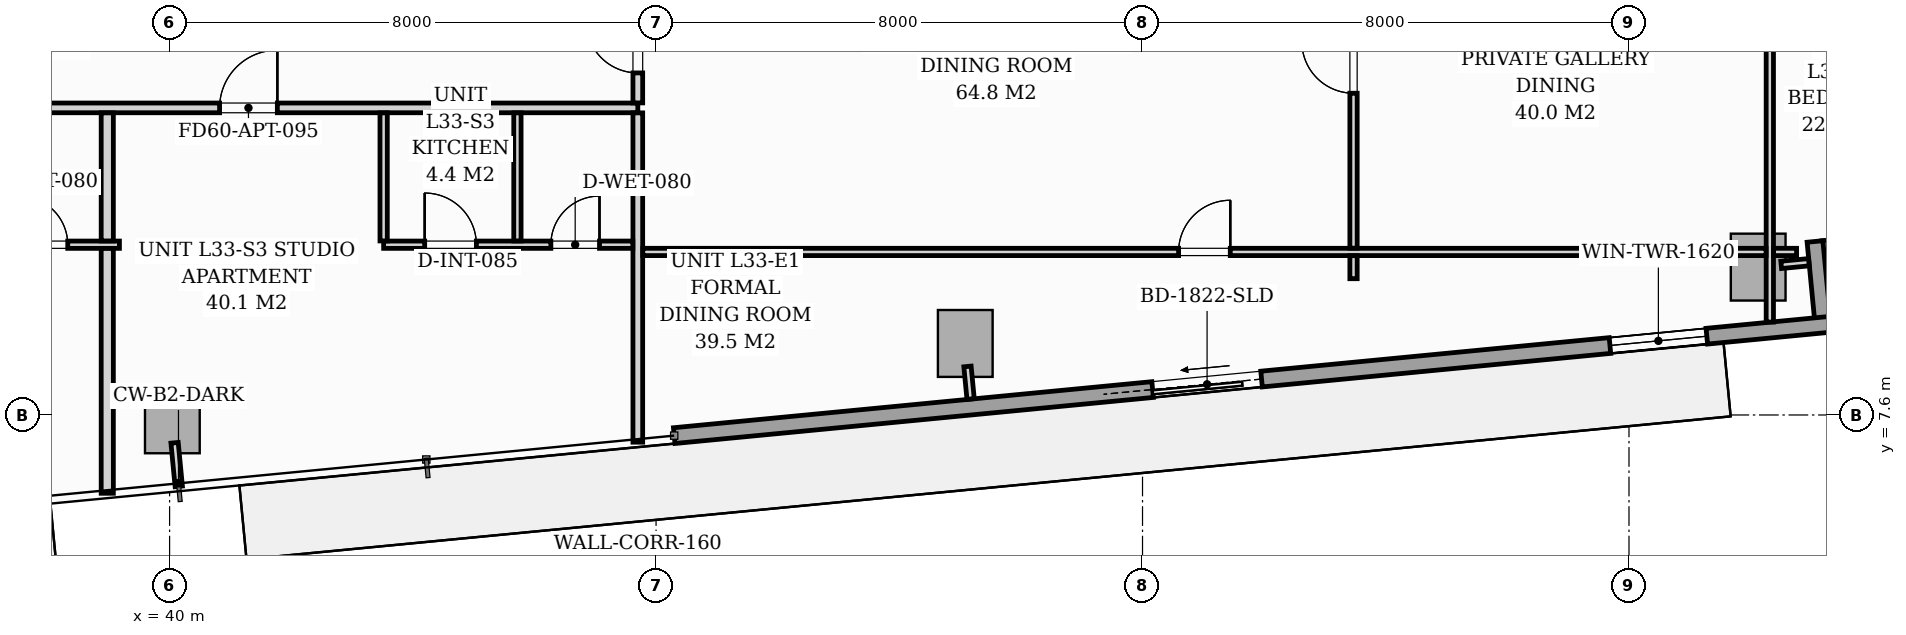
"""IFC4 building model, lengths in metres.
Left out: names, types, materials, properties, quantities, classifications, styles, units other than length and angle.
Written with IfcOpenShell. Run it as: python <this file> out.ifc"""

import sys

from ifc_helpers import new_model, si_unit, direction, frame, frame_2d, origin, origin_2d, place, context, subcontext, project, spatial, rectangle, extrude, source, transform, mapped, element, fill, save


model = new_model("IFC4")
c1 = context("Model", 3, precision=1e-05, world=origin(), true_north=direction((0.0, 1.0)))
c2 = subcontext(c1, "Body", "Model", "MODEL_VIEW")
j1 = project(units=[si_unit("LENGTHUNIT", "METRE"), si_unit("PLANEANGLEUNIT", "RADIAN")], contexts=[c1])
p1 = place(None, origin())
s1 = spatial("IfcSite", under=j1, at=p1, CompositionType="ELEMENT")
p2 = place(p1, origin())
s2 = spatial("IfcBuilding", under=s1, at=p2, CompositionType="ELEMENT")
p3 = place(p2, frame((0.0, 0.0, 116.2)))
s3 = spatial("IfcBuildingStorey", under=s2, at=p3, CompositionType="ELEMENT", Elevation=116.2)
m1 = source(origin(), c2, "Body", "SweptSolid", [
    extrude(rectangle(XDim=0.9, YDim=1.1, at=origin_2d()), origin(), (0.0, 0.0, 1.0), 3.194),
])
for number, where, z_axis, x_axis in (
    (1, (40.045, 7.521, 0.002), (0.0, 0.0, 1.0), (0.995, 0.096, 0.0)),
    (2, (53.085, 8.776, 0.002), (0.0, 0.0, 1.0), (0.995, 0.096, 0.0)),
    (3, (66.125, 10.032, 0.002), (0.0, 0.0, 1.0), (0.995, 0.096, 0.0)),
):
    element("IfcColumn", number, at=place(p3, frame(where, z_axis=z_axis, x_axis=x_axis)), inside=s3, PredefinedType="COLUMN", context=c2, shape_type="MappedRepresentation", body=[
        mapped(m1, transform((0.0, 0.0, 0.0), scale=1.0)),
    ])
p4 = place(p3, frame((68.574, 10.469, 0.0), z_axis=(0.0, 0.0, 1.0), x_axis=(-0.99540774648, -0.095725744959, 0.0)))
e4 = element("IfcWall", 4, at=p4, inside=s3, PredefinedType="STANDARD", context=c2, shape_type="SweptSolid", body=[
    extrude(rectangle(XDim=1.395, YDim=0.26, at=frame_2d((0.698, 0.0))), origin(), (0.0, 0.0, 1.0), 2.9),
])
p5 = place(p3, frame((67.059, 10.453, 0.0), z_axis=(0.0, 0.0, 1.0), x_axis=(0.095915846097, -0.995389446633, 0.0)))
e5 = element("IfcWall", 5, at=p5, inside=s3, PredefinedType="STANDARD", context=c2, shape_type="SweptSolid", body=[
    extrude(rectangle(XDim=1.395, YDim=0.26, at=frame_2d((0.697, 0.0))), origin(), (0.0, 0.0, 1.0), 2.9),
])
p6 = place(p3, frame((67.32, 9.092, 0.0), z_axis=(0.0, 0.0, 1.0), x_axis=(-0.995396521236, -0.095842399342, 0.0)))
e6 = element("IfcWall", 6, at=p6, inside=s3, PredefinedType="STANDARD", context=c2, shape_type="SweptSolid", body=[
    extrude(rectangle(XDim=19.11, YDim=0.26, at=frame_2d((9.555, 0.0))), origin(), (0.0, 0.0, 1.0), 2.9),
])
p7 = place(p6, frame((9.406, 0.0, 0.0)))
e7 = element("IfcOpeningElement", 7, at=p7, cuts=e6, PredefinedType="OPENING", context=c2, shape_type="SweptSolid", body=[
    extrude(rectangle(XDim=1.8, YDim=2.06, at=frame_2d((0.9, 1.03))), frame((0.0, 0.14, 0.0), z_axis=(0.0, -1.0, 0.0), x_axis=(1.0, 0.0, 0.0)), (0.0, 0.0, 1.0), 0.28),
])
p8 = place(p6, frame((2.05, 0.0, 0.65)))
e8 = element("IfcOpeningElement", 8, at=p8, cuts=e6, PredefinedType="OPENING", context=c2, shape_type="SweptSolid", body=[
    extrude(rectangle(XDim=1.6, YDim=1.5, at=frame_2d((0.8, 0.75))), frame((0.0, 0.14, 0.0), z_axis=(0.0, -1.0, 0.0), x_axis=(1.0, 0.0, 0.0)), (0.0, 0.0, 1.0), 0.28),
])
p9 = place(p3, frame((21.5, 12.65, 0.0), z_axis=(0.0, 0.0, 1.0), x_axis=(1.0, 0.0, 0.0)))
e9 = element("IfcWall", 9, at=p9, inside=s3, PredefinedType="PARTITIONING", context=c2, shape_type="SweptSolid", body=[
    extrude(rectangle(XDim=26.2, YDim=0.16, at=frame_2d((13.1, 0.0))), origin(), (0.0, 0.0, 1.0), 2.9),
])
p10 = place(p9, frame((5.927, 0.0, 0.0)))
e10 = element("IfcOpeningElement", 10, at=p10, cuts=e9, PredefinedType="OPENING", context=c2, shape_type="SweptSolid", body=[
    extrude(rectangle(XDim=0.95, YDim=2.06, at=frame_2d((0.475, 1.03))), frame((0.0, 0.09, 0.0), z_axis=(0.0, -1.0, 0.0), x_axis=(1.0, 0.0, 0.0)), (0.0, 0.0, 1.0), 0.18),
])
p11 = place(p9, frame((10.575, 0.0, 0.0)))
e11 = element("IfcOpeningElement", 11, at=p11, cuts=e9, PredefinedType="OPENING", context=c2, shape_type="SweptSolid", body=[
    extrude(rectangle(XDim=0.95, YDim=2.06, at=frame_2d((0.475, 1.03))), frame((0.0, 0.09, 0.0), z_axis=(0.0, -1.0, 0.0), x_axis=(1.0, 0.0, 0.0)), (0.0, 0.0, 1.0), 0.18),
])
p12 = place(p9, frame((19.322, 0.0, 0.0)))
e12 = element("IfcOpeningElement", 12, at=p12, cuts=e9, PredefinedType="OPENING", context=c2, shape_type="SweptSolid", body=[
    extrude(rectangle(XDim=0.95, YDim=2.06, at=frame_2d((0.475, 1.03))), frame((0.0, 0.09, 0.0), z_axis=(0.0, -1.0, 0.0), x_axis=(1.0, 0.0, 0.0)), (0.0, 0.0, 1.0), 0.18),
])
p13 = place(p3, frame((47.7, 7.153, 0.0), z_axis=(0.0, 0.0, 1.0), x_axis=(0.0, 1.0, 0.0)))
e13 = element("IfcWall", 13, at=p13, inside=s3, PredefinedType="PARTITIONING", context=c2, shape_type="SweptSolid", body=[
    extrude(rectangle(XDim=5.416, YDim=0.16, at=frame_2d((2.708, 0.0))), origin(), (0.0, 0.0, 1.0), 2.9),
])
p14 = place(p3, frame((47.7, 12.732, 0.0), z_axis=(0.0, 0.0, 1.0), x_axis=(0.0, 1.0, 0.0)))
e14 = element("IfcWall", 14, at=p14, inside=s3, PredefinedType="PARTITIONING", context=c2, shape_type="SweptSolid", body=[
    extrude(rectangle(XDim=7.918, YDim=0.16, at=frame_2d((3.959, 0.0))), origin(), (0.0, 0.0, 1.0), 2.9),
])
p15 = place(p14, frame((0.493, 0.0, 0.0)))
e15 = element("IfcOpeningElement", 15, at=p15, cuts=e14, PredefinedType="OPENING", context=c2, shape_type="SweptSolid", body=[
    extrude(rectangle(XDim=0.85, YDim=2.0, at=frame_2d((0.425, 1.0))), frame((0.0, 0.09, 0.0), z_axis=(0.0, -1.0, 0.0), x_axis=(1.0, 0.0, 0.0)), (0.0, 0.0, 1.0), 0.18),
])
p16 = place(p14, frame((6.311, 0.0, 0.0)))
e16 = element("IfcOpeningElement", 16, at=p16, cuts=e14, PredefinedType="OPENING", context=c2, shape_type="SweptSolid", body=[
    extrude(rectangle(XDim=0.95, YDim=2.06, at=frame_2d((0.475, 1.03))), frame((0.0, 0.09, 0.0), z_axis=(0.0, -1.0, 0.0), x_axis=(1.0, 0.0, 0.0)), (0.0, 0.0, 1.0), 0.18),
])
p17 = place(p3, frame((34.775, 10.4, 0.0), z_axis=(0.0, 0.0, 1.0), x_axis=(1.0, 0.0, 0.0)))
e17 = element("IfcWall", 17, at=p17, inside=s3, PredefinedType="PARTITIONING", context=c2, shape_type="SweptSolid", body=[
    extrude(rectangle(XDim=4.4, YDim=0.12, at=frame_2d((2.2, 0.0))), origin(), (0.0, 0.0, 1.0), 2.9),
])
p18 = place(p17, frame((0.675, 0.0, 0.0)))
e18 = element("IfcOpeningElement", 18, at=p18, cuts=e17, PredefinedType="OPENING", context=c2, shape_type="SweptSolid", body=[
    extrude(rectangle(XDim=0.85, YDim=2.05, at=frame_2d((0.425, 1.025))), frame((0.0, 0.07, 0.0), z_axis=(0.0, -1.0, 0.0), x_axis=(1.0, 0.0, 0.0)), (0.0, 0.0, 1.0), 0.14),
])
p19 = place(p17, frame((2.75, 0.0, 0.0)))
e19 = element("IfcOpeningElement", 19, at=p19, cuts=e17, PredefinedType="OPENING", context=c2, shape_type="SweptSolid", body=[
    extrude(rectangle(XDim=0.8, YDim=2.02, at=frame_2d((0.4, 1.01))), frame((0.0, 0.07, 0.0), z_axis=(0.0, -1.0, 0.0), x_axis=(1.0, 0.0, 0.0)), (0.0, 0.0, 1.0), 0.14),
])
p20 = place(p3, frame((38.975, 6.312, 0.0), z_axis=(0.0, 0.0, 1.0), x_axis=(0.0, 1.0, 0.0)))
e20 = element("IfcWall", 20, at=p20, inside=s3, PredefinedType="PARTITIONING", context=c2, shape_type="SweptSolid", body=[
    extrude(rectangle(XDim=4.025, YDim=0.2, at=frame_2d((2.013, 0.0))), origin(), (0.0, 0.0, 1.0), 2.9),
])
p21 = place(p3, frame((38.975, 10.462, 0.0), z_axis=(0.0, 0.0, 1.0), x_axis=(0.0, 1.0, 0.0)))
e21 = element("IfcWall", 21, at=p21, inside=s3, PredefinedType="PARTITIONING", context=c2, shape_type="SweptSolid", body=[
    extrude(rectangle(XDim=2.106, YDim=0.2, at=frame_2d((1.053, 0.0))), origin(), (0.0, 0.0, 1.0), 2.9),
])
p22 = place(p3, frame((43.52, 10.4, 0.0), z_axis=(0.0, 0.0, 1.0), x_axis=(1.0, 0.0, 0.0)))
e22 = element("IfcWall", 22, at=p22, inside=s3, PredefinedType="PARTITIONING", context=c2, shape_type="SweptSolid", body=[
    extrude(rectangle(XDim=4.098, YDim=0.12, at=frame_2d((2.049, 0.0))), origin(), (0.0, 0.0, 1.0), 2.9),
])
p23 = place(p22, frame((0.675, 0.0, 0.0)))
e23 = element("IfcOpeningElement", 23, at=p23, cuts=e22, PredefinedType="OPENING", context=c2, shape_type="SweptSolid", body=[
    extrude(rectangle(XDim=0.85, YDim=2.05, at=frame_2d((0.425, 1.025))), frame((0.0, 0.07, 0.0), z_axis=(0.0, -1.0, 0.0), x_axis=(1.0, 0.0, 0.0)), (0.0, 0.0, 1.0), 0.14),
])
p24 = place(p22, frame((2.75, 0.0, 0.0)))
e24 = element("IfcOpeningElement", 24, at=p24, cuts=e22, PredefinedType="OPENING", context=c2, shape_type="SweptSolid", body=[
    extrude(rectangle(XDim=0.8, YDim=2.02, at=frame_2d((0.4, 1.01))), frame((0.0, 0.07, 0.0), z_axis=(0.0, -1.0, 0.0), x_axis=(1.0, 0.0, 0.0)), (0.0, 0.0, 1.0), 0.14),
])
for number, where, z_axis, x_axis in (
    (25, (43.52, 10.462, 0.0), (0.0, 0.0, 1.0), (0.0, 1.0, 0.0)),
    (26, (45.72, 10.462, 0.0), (0.0, 0.0, 1.0), (0.0, 1.0, 0.0)),
):
    element("IfcWall", number, at=place(p3, frame(where, z_axis=z_axis, x_axis=x_axis)), inside=s3, PredefinedType="PARTITIONING", context=c2, shape_type="SweptSolid", body=[
        extrude(rectangle(XDim=2.106, YDim=0.12, at=frame_2d((1.053, 0.0))), origin(), (0.0, 0.0, 1.0), 2.9),
    ])
p25 = place(p3, frame((66.316, 9.128, 0.0), z_axis=(0.0, 0.0, 1.0), x_axis=(0.0, 1.0, 0.0)))
e27 = element("IfcWall", 27, at=p25, inside=s3, PredefinedType="PARTITIONING", context=c2, shape_type="SweptSolid", body=[
    extrude(rectangle(XDim=9.42, YDim=0.12, at=frame_2d((4.71, 0.0))), origin(), (0.0, 0.0, 1.0), 2.27),
])
p26 = place(p25, frame((4.798, 0.0, 0.0)))
e28 = element("IfcOpeningElement", 28, at=p26, cuts=e27, PredefinedType="OPENING", context=c2, shape_type="SweptSolid", body=[
    extrude(rectangle(XDim=0.85, YDim=2.05, at=frame_2d((0.425, 1.025))), frame((0.0, 0.07, 0.0), z_axis=(0.0, -1.0, 0.0), x_axis=(1.0, 0.0, 0.0)), (0.0, 0.0, 1.0), 0.14),
])
p27 = place(p3, frame((47.782, 10.281, 0.0), z_axis=(0.0, 0.0, 1.0), x_axis=(1.0, 0.0, 0.0)))
e29 = element("IfcWall", 29, at=p27, inside=s3, PredefinedType="PARTITIONING", context=c2, shape_type="SweptSolid", body=[
    extrude(rectangle(XDim=18.472, YDim=0.12, at=frame_2d((9.236, 0.0))), origin(), (0.0, 0.0, 1.0), 2.9),
])
p28 = place(p27, frame((8.811, 0.0, 0.0)))
e30 = element("IfcOpeningElement", 30, at=p28, cuts=e29, PredefinedType="OPENING", context=c2, shape_type="SweptSolid", body=[
    extrude(rectangle(XDim=0.85, YDim=2.05, at=frame_2d((0.425, 1.025))), frame((0.0, 0.07, 0.0), z_axis=(0.0, -1.0, 0.0), x_axis=(1.0, 0.0, 0.0)), (0.0, 0.0, 1.0), 0.14),
])
p29 = place(p3, frame((66.378, 10.281, 0.0), z_axis=(0.0, 0.0, 1.0), x_axis=(1.0, 0.0, 0.0)))
e31 = element("IfcWall", 31, at=p29, inside=s3, PredefinedType="PARTITIONING", context=c2, shape_type="SweptSolid", body=[
    extrude(rectangle(XDim=0.378, YDim=0.12, at=frame_2d((0.189, 0.0))), origin(), (0.0, 0.0, 1.0), 2.9),
])
p30 = place(p3, frame((59.47, 9.841, 0.0), z_axis=(0.0, 0.0, 1.0), x_axis=(0.0, 1.0, 0.0)))
e32 = element("IfcWall", 32, at=p30, inside=s3, PredefinedType="PARTITIONING", context=c2, shape_type="SweptSolid", body=[
    extrude(rectangle(XDim=0.378, YDim=0.12, at=frame_2d((0.189, 0.0))), origin(), (0.0, 0.0, 1.0), 2.9),
])
p31 = place(p3, frame((59.47, 10.343, 0.0), z_axis=(0.0, 0.0, 1.0), x_axis=(0.0, 1.0, 0.0)))
e33 = element("IfcWall", 33, at=p31, inside=s3, PredefinedType="PARTITIONING", context=c2, shape_type="SweptSolid", body=[
    extrude(rectangle(XDim=5.945, YDim=0.12, at=frame_2d((2.973, 0.0))), origin(), (0.0, 0.0, 1.0), 2.9),
])
p32 = place(p31, frame((2.548, 0.0, 0.0)))
e34 = element("IfcOpeningElement", 34, at=p32, cuts=e33, PredefinedType="OPENING", context=c2, shape_type="SweptSolid", body=[
    extrude(rectangle(XDim=0.85, YDim=2.05, at=frame_2d((0.425, 1.025))), frame((0.0, 0.07, 0.0), z_axis=(0.0, -1.0, 0.0), x_axis=(1.0, 0.0, 0.0)), (0.0, 0.0, 1.0), 0.14),
])
p33 = place(p3, frame((40.082, 7.142, 0.0), z_axis=(0.0, 0.0, 1.0), x_axis=(0.095944965663, -0.995386640238, 0.0)))
e35 = element("IfcWall", 35, at=p33, inside=s3, PredefinedType="PARTITIONING", context=c2, shape_type="SweptSolid", body=[
    extrude(rectangle(XDim=0.72, YDim=0.12, at=frame_2d((0.36, 0.0))), origin(), (0.0, 0.0, 1.0), 2.9),
])
p34 = place(p3, frame((53.121, 8.398, 0.0), z_axis=(0.0, 0.0, 1.0), x_axis=(0.096179204763, -0.995364034196, 0.0)))
e36 = element("IfcWall", 36, at=p34, inside=s3, PredefinedType="PARTITIONING", context=c2, shape_type="SweptSolid", body=[
    extrude(rectangle(XDim=0.538, YDim=0.12, at=frame_2d((0.269, 0.0))), origin(), (0.0, 0.0, 1.0), 2.9),
])
p35 = place(p3, frame((66.503, 10.068, 0.0), z_axis=(0.0, 0.0, 1.0), x_axis=(0.995389482415, 0.095915474751, 0.0)))
e37 = element("IfcWall", 37, at=p35, inside=s3, PredefinedType="PARTITIONING", context=c2, shape_type="SweptSolid", body=[
    extrude(rectangle(XDim=0.458, YDim=0.12, at=frame_2d((0.229, 0.0))), origin(), (0.0, 0.0, 1.0), 2.9),
])
m2 = source(origin(), c2, "Body", "SweptSolid", [
    extrude(rectangle(XDim=1.8, YDim=2.06, at=frame_2d((0.9, 1.03))), frame((0.0, 0.025, 0.0), z_axis=(0.0, -1.0, 0.0), x_axis=(1.0, 0.0, 0.0)), (0.0, 0.0, 1.0), 0.05),
])
p36 = place(p7, origin())
e38 = element("IfcDoor", 38, at=p36, inside=s3, OperationType="SLIDING_TO_RIGHT", PredefinedType="DOOR", context=c2, shape_type="MappedRepresentation", body=[
    mapped(m2, transform((0.0, 0.0, 0.0), scale=1.0)),
])
fill(e7, e38)
m3 = source(origin(), c2, "Body", "SweptSolid", [
    extrude(rectangle(XDim=1.6, YDim=1.5, at=frame_2d((0.8, 0.75))), frame((0.0, 0.03, 0.0), z_axis=(0.0, -1.0, 0.0), x_axis=(1.0, 0.0, 0.0)), (0.0, 0.0, 1.0), 0.06),
])
p37 = place(p8, origin())
e39 = element("IfcWindow", 39, at=p37, inside=s3, PartitioningType="SINGLE_PANEL", PredefinedType="WINDOW", context=c2, shape_type="MappedRepresentation", body=[
    mapped(m3, transform((0.0, 0.0, 0.0), scale=1.0)),
])
fill(e8, e39)
m4 = source(origin(), c2, "Body", "SweptSolid", [
    extrude(rectangle(XDim=0.8, YDim=2.02, at=frame_2d((0.4, 1.01))), frame((0.0, 0.025, 0.0), z_axis=(0.0, -1.0, 0.0), x_axis=(1.0, 0.0, 0.0)), (0.0, 0.0, 1.0), 0.05),
])
p38 = place(p19, origin())
e40 = element("IfcDoor", 40, at=p38, inside=s3, OperationType="SINGLE_SWING_LEFT", PredefinedType="DOOR", context=c2, shape_type="MappedRepresentation", body=[
    mapped(m4, transform((0.0, 0.0, 0.0), scale=1.0)),
])
fill(e19, e40)
m5 = source(origin(), c2, "Body", "SweptSolid", [
    extrude(rectangle(XDim=0.95, YDim=2.06, at=frame_2d((0.475, 1.03))), frame((0.0, 0.025, 0.0), z_axis=(0.0, -1.0, 0.0), x_axis=(1.0, 0.0, 0.0)), (0.0, 0.0, 1.0), 0.05),
])
p39 = place(p12, origin())
e41 = element("IfcDoor", 41, at=p39, inside=s3, OperationType="SINGLE_SWING_RIGHT", PredefinedType="DOOR", context=c2, shape_type="MappedRepresentation", body=[
    mapped(m5, transform((0.0, 0.0, 0.0), scale=1.0)),
])
fill(e12, e41)
m6 = source(origin(), c2, "Body", "SweptSolid", [
    extrude(rectangle(XDim=0.85, YDim=2.05, at=frame_2d((0.425, 1.025))), frame((0.0, 0.025, 0.0), z_axis=(0.0, -1.0, 0.0), x_axis=(1.0, 0.0, 0.0)), (0.0, 0.0, 1.0), 0.05),
])
p40 = place(p23, origin())
e42 = element("IfcDoor", 42, at=p40, inside=s3, OperationType="SINGLE_SWING_LEFT", PredefinedType="DOOR", context=c2, shape_type="MappedRepresentation", body=[
    mapped(m6, transform((0.0, 0.0, 0.0), scale=1.0)),
])
fill(e23, e42)
p41 = place(p24, origin())
e43 = element("IfcDoor", 43, at=p41, inside=s3, OperationType="SINGLE_SWING_RIGHT", PredefinedType="DOOR", context=c2, shape_type="MappedRepresentation", body=[
    mapped(m4, transform((0.0, 0.0, 0.0), scale=1.0)),
])
fill(e24, e43)
m7 = source(origin(), c2, "Body", "SweptSolid", [
    extrude(rectangle(XDim=0.85, YDim=2.0, at=frame_2d((0.425, 1.0))), frame((0.0, 0.025, 0.0), z_axis=(0.0, -1.0, 0.0), x_axis=(1.0, 0.0, 0.0)), (0.0, 0.0, 1.0), 0.05),
])
p42 = place(p15, origin())
e44 = element("IfcDoor", 44, at=p42, inside=s3, OperationType="SINGLE_SWING_RIGHT", PredefinedType="DOOR", context=c2, shape_type="MappedRepresentation", body=[
    mapped(m7, transform((0.0, 0.0, 0.0), scale=1.0)),
])
fill(e15, e44)
p43 = place(p28, origin())
e45 = element("IfcDoor", 45, at=p43, inside=s3, OperationType="SINGLE_SWING_RIGHT", PredefinedType="DOOR", context=c2, shape_type="MappedRepresentation", body=[
    mapped(m6, transform((0.0, 0.0, 0.0), scale=1.0)),
])
fill(e30, e45)
p44 = place(p32, origin())
e46 = element("IfcDoor", 46, at=p44, inside=s3, OperationType="SINGLE_SWING_RIGHT", PredefinedType="DOOR", context=c2, shape_type="MappedRepresentation", body=[
    mapped(m6, transform((0.0, 0.0, 0.0), scale=1.0)),
])
fill(e34, e46)
save(model, sys.argv[1])
